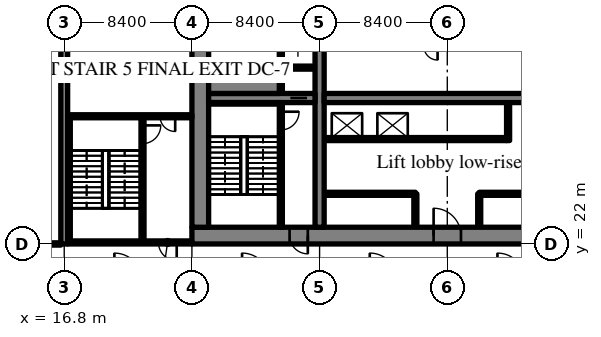
"""IFC4 building model, lengths in metres.
Left out: names, types, materials, properties, quantities, classifications, styles, units other than length and angle.
Written with IfcOpenShell. Run it as: python <this file> out.ifc"""

import sys

from ifc_helpers import new_model, si_unit, direction, frame, frame_2d, origin, place, context, subcontext, project, spatial, rectangle, extrude, source, transform, mapped, element, fill, save


model = new_model("IFC4")
c1 = context("Model", 3, precision=1e-05, world=origin(), true_north=direction((0.0, 1.0)))
c2 = subcontext(c1, "Body", "Model", "MODEL_VIEW")
j1 = project(units=[si_unit("LENGTHUNIT", "METRE"), si_unit("PLANEANGLEUNIT", "RADIAN")], contexts=[c1])
p1 = place(None, origin())
s1 = spatial("IfcSite", under=j1, at=p1, CompositionType="ELEMENT")
p2 = place(p1, origin())
s2 = spatial("IfcBuilding", under=s1, at=p2, CompositionType="ELEMENT")
p3 = place(p2, origin())
s3 = spatial("IfcBuildingStorey", under=s2, at=p3, CompositionType="ELEMENT", Elevation=0.0)
m1 = source(origin(), c2, "Body", "SweptSolid", [
    extrude(rectangle(XDim=50.4, YDim=1.1, at=frame_2d((25.2, 0.0))), origin(), (0.0, 0.0, 1.0), 5.72),
])
p4 = place(p3, frame((25.2, 22.55, 0.0), z_axis=(0.0, 0.0, 1.0), x_axis=(1.0, 0.0, 0.0)))
e1 = element("IfcWall", 1, at=p4, inside=s3, PredefinedType="SHEAR", context=c2, shape_type="MappedRepresentation", body=[
    mapped(m1, transform((0.0, 0.0, 0.0), scale=1.0)),
])
m2 = source(origin(), c2, "Body", "SweptSolid", [
    extrude(rectangle(XDim=1.8, YDim=2.1, at=frame_2d((0.9, 1.05))), frame((0.0, 0.56, 0.0), z_axis=(0.0, -1.0, 0.0), x_axis=(1.0, 0.0, 0.0)), (0.0, 0.0, 1.0), 1.12),
])
p5 = place(p4, frame((15.9, 0.0, 0.0)))
e2 = element("IfcOpeningElement", 2, at=p5, cuts=e1, PredefinedType="OPENING", context=c2, shape_type="MappedRepresentation", body=[
    mapped(m2, transform((0.0, 0.0, 0.0), scale=1.0)),
])
p6 = place(p4, frame((32.7, 0.0, 0.0)))
e3 = element("IfcOpeningElement", 3, at=p6, cuts=e1, PredefinedType="OPENING", context=c2, shape_type="MappedRepresentation", body=[
    mapped(m2, transform((0.0, 0.0, 0.0), scale=1.0)),
])
m3 = source(origin(), c2, "Body", "SweptSolid", [
    extrude(rectangle(XDim=0.9, YDim=2.1, at=frame_2d((0.45, 1.05))), frame((0.0, 0.56, 0.0), z_axis=(0.0, -1.0, 0.0), x_axis=(1.0, 0.0, 0.0)), (0.0, 0.0, 1.0), 1.12),
])
p7 = place(p4, frame((39.75, 0.0, 0.0)))
e4 = element("IfcOpeningElement", 4, at=p7, cuts=e1, PredefinedType="OPENING", context=c2, shape_type="MappedRepresentation", body=[
    mapped(m3, transform((0.0, 0.0, 0.0), scale=1.0)),
])
p8 = place(p4, frame((28.05, 0.0, 0.0)))
e5 = element("IfcOpeningElement", 5, at=p8, cuts=e1, PredefinedType="OPENING", context=c2, shape_type="MappedRepresentation", body=[
    mapped(m3, transform((0.0, 0.0, 0.0), scale=1.0)),
])
m4 = source(origin(), c2, "Body", "SweptSolid", [
    extrude(rectangle(XDim=1.2, YDim=2.1, at=frame_2d((0.6, 1.05))), frame((0.0, 0.56, 0.0), z_axis=(0.0, -1.0, 0.0), x_axis=(1.0, 0.0, 0.0)), (0.0, 0.0, 1.0), 1.12),
])
p9 = place(p4, frame((6.425, 0.0, 0.0)))
e6 = element("IfcOpeningElement", 6, at=p9, cuts=e1, PredefinedType="OPENING", context=c2, shape_type="MappedRepresentation", body=[
    mapped(m4, transform((0.0, 0.0, 0.0), scale=1.0)),
])
p10 = place(p4, frame((47.675, 0.0, 0.0)))
e7 = element("IfcOpeningElement", 7, at=p10, cuts=e1, PredefinedType="OPENING", context=c2, shape_type="MappedRepresentation", body=[
    mapped(m4, transform((0.0, 0.0, 0.0), scale=1.0)),
])
m5 = source(origin(), c2, "Body", "SweptSolid", [
    extrude(rectangle(XDim=17.8, YDim=1.1, at=frame_2d((8.9, 0.0))), origin(), (0.0, 0.0, 1.0), 5.72),
])
p11 = place(p3, frame((25.75, 23.1, 0.0), z_axis=(0.0, 0.0, 1.0), x_axis=(0.0, 1.0, 0.0)))
e8 = element("IfcWall", 8, at=p11, inside=s3, PredefinedType="SHEAR", context=c2, shape_type="MappedRepresentation", body=[
    mapped(m5, transform((0.0, 0.0, 0.0), scale=1.0)),
])
m6 = source(origin(), c2, "Body", "SweptSolid", [
    extrude(rectangle(XDim=17.8, YDim=0.6, at=frame_2d((8.9, 0.0))), origin(), (0.0, 0.0, 1.0), 5.72),
])
p12 = place(p3, frame((33.6, 23.1, 0.0), z_axis=(0.0, 0.0, 1.0), x_axis=(0.0, 1.0, 0.0)))
e9 = element("IfcWall", 9, at=p12, inside=s3, PredefinedType="SHEAR", context=c2, shape_type="MappedRepresentation", body=[
    mapped(m6, transform((0.0, 0.0, 0.0), scale=1.0)),
])
m7 = source(origin(), c2, "Body", "SweptSolid", [
    extrude(rectangle(XDim=1.1, YDim=2.1, at=frame_2d((0.55, 1.05))), frame((0.0, 0.31, 0.0), z_axis=(0.0, -1.0, 0.0), x_axis=(1.0, 0.0, 0.0)), (0.0, 0.0, 1.0), 0.62),
])
p13 = place(p12, frame((12.35, 0.0, 0.0)))
e10 = element("IfcOpeningElement", 10, at=p13, cuts=e9, PredefinedType="OPENING", context=c2, shape_type="MappedRepresentation", body=[
    mapped(m7, transform((0.0, 0.0, 0.0), scale=1.0)),
])
m8 = source(origin(), c2, "Body", "SweptSolid", [
    extrude(rectangle(XDim=7.0, YDim=0.6, at=frame_2d((3.5, 0.0))), origin(), (0.0, 0.0, 1.0), 5.72),
])
p14 = place(p3, frame((26.3, 31.6, 0.0), z_axis=(0.0, 0.0, 1.0), x_axis=(1.0, 0.0, 0.0)))
e11 = element("IfcWall", 11, at=p14, inside=s3, PredefinedType="SHEAR", context=c2, shape_type="MappedRepresentation", body=[
    mapped(m8, transform((0.0, 0.0, 0.0), scale=1.0)),
])
p15 = place(p14, frame((5.375, 0.0, 0.0)))
e12 = element("IfcOpeningElement", 12, at=p15, cuts=e11, PredefinedType="OPENING", context=c2, shape_type="MappedRepresentation", body=[
    mapped(m7, transform((0.0, 0.0, 0.0), scale=1.0)),
])
m9 = source(origin(), c2, "Body", "SweptSolid", [
    extrude(rectangle(XDim=16.2, YDim=0.6, at=frame_2d((8.1, 0.0))), origin(), (0.0, 0.0, 1.0), 5.72),
])
p16 = place(p3, frame((33.9, 31.6, 0.0), z_axis=(0.0, 0.0, 1.0), x_axis=(1.0, 0.0, 0.0)))
e13 = element("IfcWall", 13, at=p16, inside=s3, PredefinedType="SHEAR", context=c2, shape_type="MappedRepresentation", body=[
    mapped(m9, transform((0.0, 0.0, 0.0), scale=1.0)),
])
m10 = source(origin(), c2, "Body", "SweptSolid", [
    extrude(rectangle(XDim=1.0, YDim=2.1, at=frame_2d((0.5, 1.05))), frame((0.0, 0.31, 0.0), z_axis=(0.0, -1.0, 0.0), x_axis=(1.0, 0.0, 0.0)), (0.0, 0.0, 1.0), 0.62),
])
p17 = place(p16, frame((14.65, 0.0, 0.0)))
e14 = element("IfcOpeningElement", 14, at=p17, cuts=e13, PredefinedType="OPENING", context=c2, shape_type="MappedRepresentation", body=[
    mapped(m10, transform((0.0, 0.0, 0.0), scale=1.0)),
])
m11 = source(origin(), c2, "Body", "SweptSolid", [
    extrude(rectangle(XDim=20.0, YDim=0.45, at=frame_2d((10.0, 0.0))), origin(), (0.0, 0.0, 1.0), 5.72),
])
p18 = place(p3, frame((16.8, 22.0, 0.0), z_axis=(0.0, 0.0, 1.0), x_axis=(0.0, 1.0, 0.0)))
e15 = element("IfcWall", 15, at=p18, inside=s3, PredefinedType="SHEAR", context=c2, shape_type="MappedRepresentation", body=[
    mapped(m11, transform((0.0, 0.0, 0.0), scale=1.0)),
])
m12 = source(origin(), c2, "Body", "SweptSolid", [
    extrude(rectangle(XDim=6.0, YDim=0.2, at=frame_2d((3.0, 0.0))), origin(), (0.0, 0.0, 1.0), 5.72),
])
p19 = place(p3, frame((33.9, 25.3, 0.0), z_axis=(0.0, 0.0, 1.0), x_axis=(1.0, 0.0, 0.0)))
e16 = element("IfcWall", 16, at=p19, inside=s3, PredefinedType="SOLIDWALL", context=c2, shape_type="MappedRepresentation", body=[
    mapped(m12, transform((0.0, 0.0, 0.0), scale=1.0)),
])
m13 = source(origin(), c2, "Body", "SweptSolid", [
    extrude(rectangle(XDim=1.1, YDim=2.1, at=frame_2d((0.55, 1.05))), frame((0.0, 0.11, 0.0), z_axis=(0.0, -1.0, 0.0), x_axis=(1.0, 0.0, 0.0)), (0.0, 0.0, 1.0), 0.22),
])
p20 = place(p19, frame((0.95, 0.0, 0.0)))
e17 = element("IfcOpeningElement", 17, at=p20, cuts=e16, PredefinedType="OPENING", context=c2, shape_type="MappedRepresentation", body=[
    mapped(m13, transform((0.0, 0.0, 0.0), scale=1.0)),
])
p21 = place(p19, frame((3.95, 0.0, 0.0)))
e18 = element("IfcOpeningElement", 18, at=p21, cuts=e16, PredefinedType="OPENING", context=c2, shape_type="MappedRepresentation", body=[
    mapped(m13, transform((0.0, 0.0, 0.0), scale=1.0)),
])
p22 = place(p3, frame((44.1, 25.3, 0.0), z_axis=(0.0, 0.0, 1.0), x_axis=(1.0, 0.0, 0.0)))
e19 = element("IfcWall", 19, at=p22, inside=s3, PredefinedType="SOLIDWALL", context=c2, shape_type="MappedRepresentation", body=[
    mapped(m12, transform((0.0, 0.0, 0.0), scale=1.0)),
])
p23 = place(p22, frame((0.95, 0.0, 0.0)))
e20 = element("IfcOpeningElement", 20, at=p23, cuts=e19, PredefinedType="OPENING", context=c2, shape_type="MappedRepresentation", body=[
    mapped(m13, transform((0.0, 0.0, 0.0), scale=1.0)),
])
p24 = place(p22, frame((3.95, 0.0, 0.0)))
e21 = element("IfcOpeningElement", 21, at=p24, cuts=e19, PredefinedType="OPENING", context=c2, shape_type="MappedRepresentation", body=[
    mapped(m13, transform((0.0, 0.0, 0.0), scale=1.0)),
])
m14 = source(origin(), c2, "Body", "SweptSolid", [
    extrude(rectangle(XDim=12.0, YDim=0.2, at=frame_2d((6.0, 0.0))), origin(), (0.0, 0.0, 1.0), 5.72),
])
p25 = place(p3, frame((33.9, 28.9, 0.0), z_axis=(0.0, 0.0, 1.0), x_axis=(1.0, 0.0, 0.0)))
e22 = element("IfcWall", 22, at=p25, inside=s3, PredefinedType="SOLIDWALL", context=c2, shape_type="MappedRepresentation", body=[
    mapped(m14, transform((0.0, 0.0, 0.0), scale=1.0)),
])
p26 = place(p25, frame((0.95, 0.0, 0.0)))
e23 = element("IfcOpeningElement", 23, at=p26, cuts=e22, PredefinedType="OPENING", context=c2, shape_type="MappedRepresentation", body=[
    mapped(m13, transform((0.0, 0.0, 0.0), scale=1.0)),
])
p27 = place(p25, frame((3.95, 0.0, 0.0)))
e24 = element("IfcOpeningElement", 24, at=p27, cuts=e22, PredefinedType="OPENING", context=c2, shape_type="MappedRepresentation", body=[
    mapped(m13, transform((0.0, 0.0, 0.0), scale=1.0)),
])
p28 = place(p25, frame((6.95, 0.0, 0.0)))
e25 = element("IfcOpeningElement", 25, at=p28, cuts=e22, PredefinedType="OPENING", context=c2, shape_type="MappedRepresentation", body=[
    mapped(m13, transform((0.0, 0.0, 0.0), scale=1.0)),
])
p29 = place(p25, frame((9.95, 0.0, 0.0)))
e26 = element("IfcOpeningElement", 26, at=p29, cuts=e22, PredefinedType="OPENING", context=c2, shape_type="MappedRepresentation", body=[
    mapped(m13, transform((0.0, 0.0, 0.0), scale=1.0)),
])
m15 = source(origin(), c2, "Body", "SweptSolid", [
    extrude(rectangle(XDim=2.2, YDim=0.2, at=frame_2d((1.1, 0.0))), origin(), (0.0, 0.0, 1.0), 5.72),
])
for number, where, z_axis, x_axis in (
    (27, (39.9, 23.1, 0.0), (0.0, 0.0, 1.0), (0.0, 1.0, 0.0)),
    (28, (44.1, 23.1, 0.0), (0.0, 0.0, 1.0), (0.0, 1.0, 0.0)),
):
    element("IfcWall", number, at=place(p3, frame(where, z_axis=z_axis, x_axis=x_axis)), inside=s3, PredefinedType="SOLIDWALL", context=c2, shape_type="MappedRepresentation", body=[
        mapped(m15, transform((0.0, 0.0, 0.0), scale=1.0)),
    ])
m16 = source(origin(), c2, "Body", "SweptSolid", [
    extrude(rectangle(XDim=2.5, YDim=0.2, at=frame_2d((1.25, 0.0))), origin(), (0.0, 0.0, 1.0), 5.72),
])
p30 = place(p3, frame((46.0, 28.8, 0.0), z_axis=(0.0, 0.0, 1.0), x_axis=(0.0, 1.0, 0.0)))
e29 = element("IfcWall", 29, at=p30, inside=s3, PredefinedType="SOLIDWALL", context=c2, shape_type="MappedRepresentation", body=[
    mapped(m16, transform((0.0, 0.0, 0.0), scale=1.0)),
])
m17 = source(origin(), c2, "Body", "SweptSolid", [
    extrude(rectangle(XDim=8.2, YDim=0.2, at=frame_2d((4.1, 0.0))), origin(), (0.0, 0.0, 1.0), 5.72),
])
p31 = place(p3, frame((31.05, 23.1, 0.0), z_axis=(0.0, 0.0, 1.0), x_axis=(0.0, 1.0, 0.0)))
e30 = element("IfcWall", 30, at=p31, inside=s3, PredefinedType="SOLIDWALL", context=c2, shape_type="MappedRepresentation", body=[
    mapped(m17, transform((0.0, 0.0, 0.0), scale=1.0)),
])
m18 = source(origin(), c2, "Body", "SweptSolid", [
    extrude(rectangle(XDim=1.2, YDim=2.1, at=frame_2d((0.6, 1.05))), frame((0.0, 0.11, 0.0), z_axis=(0.0, -1.0, 0.0), x_axis=(1.0, 0.0, 0.0)), (0.0, 0.0, 1.0), 0.22),
])
p32 = place(p31, frame((6.4, 0.0, 0.0)))
e31 = element("IfcOpeningElement", 31, at=p32, cuts=e30, PredefinedType="OPENING", context=c2, shape_type="MappedRepresentation", body=[
    mapped(m18, transform((0.0, 0.0, 0.0), scale=1.0)),
])
m19 = source(origin(), c2, "Body", "SweptSolid", [
    extrude(rectangle(XDim=1.7, YDim=0.2, at=frame_2d((0.85, 0.0))), origin(), (0.0, 0.0, 1.0), 5.72),
])
p33 = place(p3, frame((31.05, 31.9, 0.0), z_axis=(0.0, 0.0, 1.0), x_axis=(0.0, 1.0, 0.0)))
e32 = element("IfcWall", 32, at=p33, inside=s3, PredefinedType="SOLIDWALL", context=c2, shape_type="MappedRepresentation", body=[
    mapped(m19, transform((0.0, 0.0, 0.0), scale=1.0)),
])
m20 = source(origin(), c2, "Body", "SweptSolid", [
    extrude(rectangle(XDim=2.15, YDim=0.2, at=frame_2d((1.075, 0.0))), origin(), (0.0, 0.0, 1.0), 5.72),
])
p34 = place(p3, frame((31.15, 33.6, 0.0), z_axis=(0.0, 0.0, 1.0), x_axis=(1.0, 0.0, 0.0)))
e33 = element("IfcWall", 33, at=p34, inside=s3, PredefinedType="SOLIDWALL", context=c2, shape_type="MappedRepresentation", body=[
    mapped(m20, transform((0.0, 0.0, 0.0), scale=1.0)),
])
m21 = source(origin(), c2, "Body", "SweptSolid", [
    extrude(rectangle(XDim=7.3, YDim=0.2, at=frame_2d((3.65, 0.0))), origin(), (0.0, 0.0, 1.0), 5.72),
])
p35 = place(p3, frame((31.05, 33.6, 0.0), z_axis=(0.0, 0.0, 1.0), x_axis=(0.0, 1.0, 0.0)))
e34 = element("IfcWall", 34, at=p35, inside=s3, PredefinedType="SOLIDWALL", context=c2, shape_type="MappedRepresentation", body=[
    mapped(m21, transform((0.0, 0.0, 0.0), scale=1.0)),
])
m22 = source(origin(), c2, "Body", "SweptSolid", [
    extrude(rectangle(XDim=1.8, YDim=2.1, at=frame_2d((0.9, 1.05))), frame((0.0, 0.11, 0.0), z_axis=(0.0, -1.0, 0.0), x_axis=(1.0, 0.0, 0.0)), (0.0, 0.0, 1.0), 0.22),
])
p36 = place(p35, frame((5.3, 0.0, 0.0)))
e35 = element("IfcOpeningElement", 35, at=p36, cuts=e34, PredefinedType="OPENING", context=c2, shape_type="MappedRepresentation", body=[
    mapped(m22, transform((0.0, 0.0, 0.0), scale=1.0)),
])
m23 = source(origin(), c2, "Body", "SweptSolid", [
    extrude(rectangle(XDim=8.3, YDim=0.2, at=frame_2d((4.15, 0.0))), origin(), (0.0, 0.0, 1.0), 5.72),
])
p37 = place(p3, frame((21.95, 22.1, 0.0), z_axis=(0.0, 0.0, 1.0), x_axis=(0.0, 1.0, 0.0)))
e36 = element("IfcWall", 36, at=p37, inside=s3, PredefinedType="SOLIDWALL", context=c2, shape_type="MappedRepresentation", body=[
    mapped(m23, transform((0.0, 0.0, 0.0), scale=1.0)),
])
p38 = place(p37, frame((6.5, 0.0, 0.0)))
e37 = element("IfcOpeningElement", 37, at=p38, cuts=e36, PredefinedType="OPENING", context=c2, shape_type="MappedRepresentation", body=[
    mapped(m18, transform((0.0, 0.0, 0.0), scale=1.0)),
])
m24 = source(origin(), c2, "Body", "SweptSolid", [
    extrude(rectangle(XDim=8.175, YDim=0.2, at=frame_2d((4.087, 0.0))), origin(), (0.0, 0.0, 1.0), 5.72),
])
p39 = place(p3, frame((17.025, 22.1, 0.0), z_axis=(0.0, 0.0, 1.0), x_axis=(1.0, 0.0, 0.0)))
e38 = element("IfcWall", 38, at=p39, inside=s3, PredefinedType="SOLIDWALL", context=c2, shape_type="MappedRepresentation", body=[
    mapped(m24, transform((0.0, 0.0, 0.0), scale=1.0)),
])
p40 = place(p39, frame((5.975, 0.0, 0.0)))
e39 = element("IfcOpeningElement", 39, at=p40, cuts=e38, PredefinedType="OPENING", context=c2, shape_type="MappedRepresentation", body=[
    mapped(m18, transform((0.0, 0.0, 0.0), scale=1.0)),
])
p41 = place(p3, frame((17.025, 30.4, 0.0), z_axis=(0.0, 0.0, 1.0), x_axis=(1.0, 0.0, 0.0)))
e40 = element("IfcWall", 40, at=p41, inside=s3, PredefinedType="SOLIDWALL", context=c2, shape_type="MappedRepresentation", body=[
    mapped(m24, transform((0.0, 0.0, 0.0), scale=1.0)),
])
m25 = source(origin(), c2, "Body", "SweptSolid", [
    extrude(rectangle(XDim=1.0, YDim=2.1, at=frame_2d((0.5, 1.05))), frame((0.0, 0.11, 0.0), z_axis=(0.0, -1.0, 0.0), x_axis=(1.0, 0.0, 0.0)), (0.0, 0.0, 1.0), 0.22),
])
p42 = place(p41, frame((6.075, 0.0, 0.0)))
e41 = element("IfcOpeningElement", 41, at=p42, cuts=e40, PredefinedType="OPENING", context=c2, shape_type="MappedRepresentation", body=[
    mapped(m25, transform((0.0, 0.0, 0.0), scale=1.0)),
])
m26 = source(origin(), c2, "Body", "SweptSolid", [
    extrude(rectangle(XDim=4.65, YDim=0.1, at=frame_2d((2.325, 0.0))), origin(), (0.0, 0.0, 1.0), 5.72),
])
p43 = place(p3, frame((26.3, 31.25, 0.0), z_axis=(0.0, 0.0, 1.0), x_axis=(1.0, 0.0, 0.0)))
e42 = element("IfcWall", 42, at=p43, inside=s3, PredefinedType="SOLIDWALL", context=c2, shape_type="MappedRepresentation", body=[
    mapped(m26, transform((0.0, 0.0, 0.0), scale=1.0)),
])
m27 = source(origin(), c2, "Body", "SweptSolid", [
    extrude(rectangle(XDim=8.1, YDim=0.175, at=frame_2d((4.05, 0.0))), origin(), (0.0, 0.0, 1.0), 5.72),
])
p44 = place(p3, frame((17.112, 22.2, 0.0), z_axis=(0.0, 0.0, 1.0), x_axis=(0.0, 1.0, 0.0)))
e43 = element("IfcWall", 43, at=p44, inside=s3, PredefinedType="SOLIDWALL", context=c2, shape_type="MappedRepresentation", body=[
    mapped(m27, transform((0.0, 0.0, 0.0), scale=1.0)),
])
m28 = source(origin(), c2, "Body", "SweptSolid", [
    extrude(rectangle(XDim=4.65, YDim=0.9, at=frame_2d((2.325, 0.0))), origin(), (0.0, 0.0, 1.0), 5.72),
])
p45 = place(p3, frame((26.3, 32.35, 0.0), z_axis=(0.0, 0.0, 1.0), x_axis=(1.0, 0.0, 0.0)))
e44 = element("IfcWall", 44, at=p45, inside=s3, PredefinedType="SOLIDWALL", context=c2, shape_type="MappedRepresentation", body=[
    mapped(m28, transform((0.0, 0.0, 0.0), scale=1.0)),
])
m29 = source(origin(), c2, "Body", "SweptSolid", [
    extrude(rectangle(XDim=7.95, YDim=0.15, at=frame_2d((3.975, 0.0))), origin(), (0.0, 0.0, 1.0), 5.02),
])
p46 = place(p3, frame((8.625, 22.0, 0.0), z_axis=(0.0, 0.0, 1.0), x_axis=(1.0, 0.0, 0.0)))
e45 = element("IfcWall", 45, at=p46, inside=s3, PredefinedType="PARTITIONING", context=c2, shape_type="MappedRepresentation", body=[
    mapped(m29, transform((0.0, 0.0, 0.0), scale=1.0)),
])
m30 = source(origin(), c2, "Body", "SweptSolid", [
    extrude(rectangle(XDim=1.8, YDim=2.1, at=frame_2d((0.9, 1.05))), frame((0.0, 0.085, 0.0), z_axis=(0.0, -1.0, 0.0), x_axis=(1.0, 0.0, 0.0)), (0.0, 0.0, 1.0), 0.17),
])
p47 = place(p46, frame((3.075, 0.0, 0.0)))
e46 = element("IfcOpeningElement", 46, at=p47, cuts=e45, PredefinedType="OPENING", context=c2, shape_type="MappedRepresentation", body=[
    mapped(m30, transform((0.0, 0.0, 0.0), scale=1.0)),
])
m31 = source(origin(), c2, "Body", "SweptSolid", [
    extrude(rectangle(XDim=1.8, YDim=2.1, at=frame_2d((0.9, 1.05))), frame((0.0, 0.325, 0.0), z_axis=(0.0, -1.0, 0.0), x_axis=(1.0, 0.0, 0.0)), (0.0, 0.0, 1.0), 0.05),
])
p48 = place(p5, origin())
e47 = element("IfcDoor", 47, at=p48, inside=s3, OperationType="DOUBLE_DOOR_SINGLE_SWING", PredefinedType="DOOR", context=c2, shape_type="MappedRepresentation", body=[
    mapped(m31, transform((0.0, 0.0, 0.0), scale=1.0)),
])
fill(e2, e47)
m32 = source(origin(), c2, "Body", "SweptSolid", [
    extrude(rectangle(XDim=1.1, YDim=2.1, at=frame_2d((0.55, 1.05))), frame((0.0, 0.025, 0.0), z_axis=(0.0, -1.0, 0.0), x_axis=(1.0, 0.0, 0.0)), (0.0, 0.0, 1.0), 0.05),
])
p49 = place(p20, origin())
e48 = element("IfcDoor", 48, at=p49, inside=s3, OperationType="SLIDING_TO_LEFT", PredefinedType="DOOR", context=c2, shape_type="MappedRepresentation", body=[
    mapped(m32, transform((0.0, 0.0, 0.0), scale=1.0)),
])
fill(e17, e48)
p50 = place(p21, origin())
e49 = element("IfcDoor", 49, at=p50, inside=s3, OperationType="SLIDING_TO_RIGHT", PredefinedType="DOOR", context=c2, shape_type="MappedRepresentation", body=[
    mapped(m32, transform((0.0, 0.0, 0.0), scale=1.0)),
])
fill(e18, e49)
p51 = place(p23, origin())
e50 = element("IfcDoor", 50, at=p51, inside=s3, OperationType="SLIDING_TO_LEFT", PredefinedType="DOOR", context=c2, shape_type="MappedRepresentation", body=[
    mapped(m32, transform((0.0, 0.0, 0.0), scale=1.0)),
])
fill(e20, e50)
p52 = place(p26, origin())
e51 = element("IfcDoor", 51, at=p52, inside=s3, OperationType="SLIDING_TO_LEFT", PredefinedType="DOOR", context=c2, shape_type="MappedRepresentation", body=[
    mapped(m32, transform((0.0, 0.0, 0.0), scale=1.0)),
])
fill(e23, e51)
p53 = place(p27, origin())
e52 = element("IfcDoor", 52, at=p53, inside=s3, OperationType="SLIDING_TO_RIGHT", PredefinedType="DOOR", context=c2, shape_type="MappedRepresentation", body=[
    mapped(m32, transform((0.0, 0.0, 0.0), scale=1.0)),
])
fill(e24, e52)
p54 = place(p28, origin())
e53 = element("IfcDoor", 53, at=p54, inside=s3, OperationType="SLIDING_TO_LEFT", PredefinedType="DOOR", context=c2, shape_type="MappedRepresentation", body=[
    mapped(m32, transform((0.0, 0.0, 0.0), scale=1.0)),
])
fill(e25, e53)
p55 = place(p29, origin())
e54 = element("IfcDoor", 54, at=p55, inside=s3, OperationType="SLIDING_TO_RIGHT", PredefinedType="DOOR", context=c2, shape_type="MappedRepresentation", body=[
    mapped(m32, transform((0.0, 0.0, 0.0), scale=1.0)),
])
fill(e26, e54)
m33 = source(origin(), c2, "Body", "SweptSolid", [
    extrude(rectangle(XDim=1.2, YDim=2.1, at=frame_2d((0.6, 1.05))), frame((0.0, 0.025, 0.0), z_axis=(0.0, -1.0, 0.0), x_axis=(1.0, 0.0, 0.0)), (0.0, 0.0, 1.0), 0.05),
])
p56 = place(p32, origin())
e55 = element("IfcDoor", 55, at=p56, inside=s3, OperationType="SINGLE_SWING_RIGHT", PredefinedType="DOOR", context=c2, shape_type="MappedRepresentation", body=[
    mapped(m33, transform((0.0, 0.0, 0.0), scale=1.0)),
])
fill(e31, e55)
m34 = source(origin(), c2, "Body", "SweptSolid", [
    extrude(rectangle(XDim=1.2, YDim=2.1, at=frame_2d((0.6, 1.05))), frame((0.0, 0.325, 0.0), z_axis=(0.0, -1.0, 0.0), x_axis=(1.0, 0.0, 0.0)), (0.0, 0.0, 1.0), 0.05),
])
p57 = place(p9, origin())
e56 = element("IfcDoor", 56, at=p57, inside=s3, OperationType="SINGLE_SWING_RIGHT", PredefinedType="DOOR", context=c2, shape_type="MappedRepresentation", body=[
    mapped(m34, transform((0.0, 0.0, 0.0), scale=1.0)),
])
fill(e6, e56)
p58 = place(p15, origin())
e57 = element("IfcDoor", 57, at=p58, inside=s3, OperationType="SLIDING_TO_LEFT", PredefinedType="DOOR", context=c2, shape_type="MappedRepresentation", body=[
    mapped(m32, transform((0.0, 0.0, 0.0), scale=1.0)),
])
fill(e12, e57)
p59 = place(p38, origin())
e58 = element("IfcDoor", 58, at=p59, inside=s3, OperationType="SINGLE_SWING_RIGHT", PredefinedType="DOOR", context=c2, shape_type="MappedRepresentation", body=[
    mapped(m33, transform((0.0, 0.0, 0.0), scale=1.0)),
])
fill(e37, e58)
p60 = place(p40, origin())
e59 = element("IfcDoor", 59, at=p60, inside=s3, OperationType="SINGLE_SWING_RIGHT", PredefinedType="DOOR", context=c2, shape_type="MappedRepresentation", body=[
    mapped(m33, transform((0.0, 0.0, 0.0), scale=1.0)),
])
fill(e39, e59)
m35 = source(origin(), c2, "Body", "SweptSolid", [
    extrude(rectangle(XDim=1.0, YDim=2.1, at=frame_2d((0.5, 1.05))), frame((0.0, 0.025, 0.0), z_axis=(0.0, -1.0, 0.0), x_axis=(1.0, 0.0, 0.0)), (0.0, 0.0, 1.0), 0.05),
])
p61 = place(p42, origin())
e60 = element("IfcDoor", 60, at=p61, inside=s3, OperationType="SINGLE_SWING_RIGHT", PredefinedType="DOOR", context=c2, shape_type="MappedRepresentation", body=[
    mapped(m35, transform((0.0, 0.0, 0.0), scale=1.0)),
])
fill(e41, e60)
save(model, sys.argv[1])
